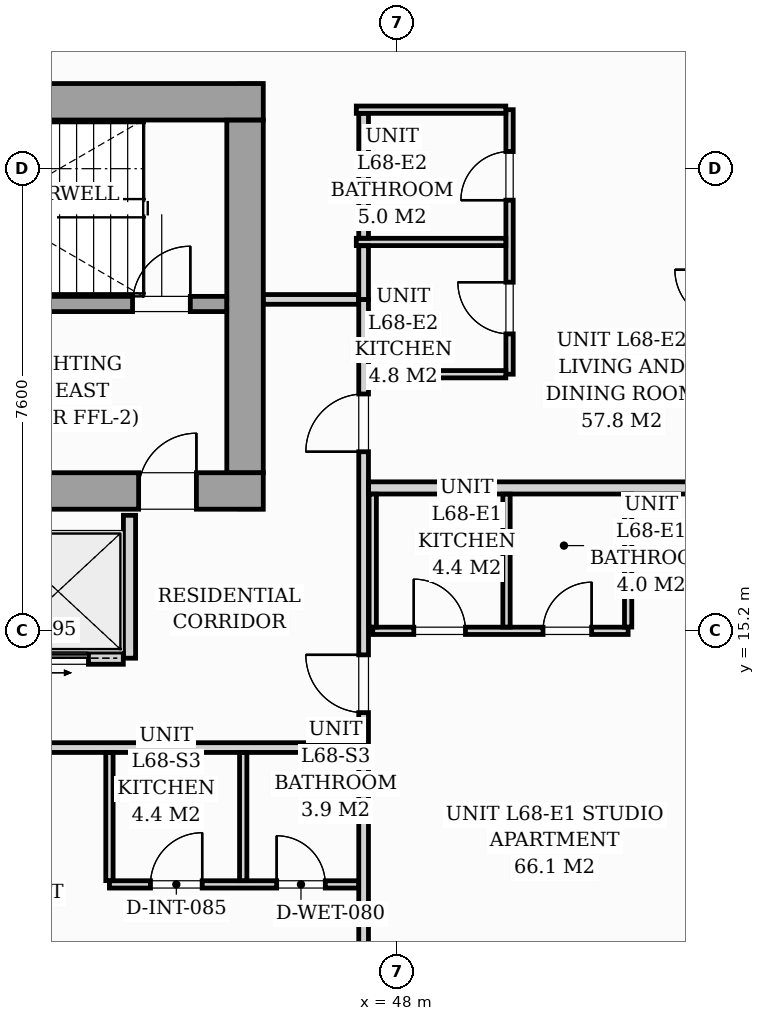
"""IFC4 building model, lengths in metres.
Left out: names, types, materials, properties, quantities, classifications, styles, units other than length and angle.
Written with IfcOpenShell. Run it as: python <this file> out.ifc"""

import sys

from ifc_helpers import new_model, si_unit, direction, frame, frame_2d, origin, origin_2d, place, context, subcontext, project, spatial, rectangle, i_section, extrude, source, transform, mapped, element, fill, save


model = new_model("IFC4")
c1 = context("Model", 3, precision=1e-05, world=origin(), true_north=direction((0.0, 1.0)))
c2 = subcontext(c1, "Body", "Model", "MODEL_VIEW")
j1 = project(units=[si_unit("LENGTHUNIT", "METRE"), si_unit("PLANEANGLEUNIT", "RADIAN")], contexts=[c1])
p1 = place(None, origin())
s1 = spatial("IfcSite", under=j1, at=p1, CompositionType="ELEMENT")
p2 = place(p1, origin())
s2 = spatial("IfcBuilding", under=s1, at=p2, CompositionType="ELEMENT")
p3 = place(p2, frame((0.0, 0.0, 236.4)))
s3 = spatial("IfcBuildingStorey", under=s2, at=p3, CompositionType="ELEMENT", Elevation=236.4)
m1 = source(origin(), c2, "Body", "SweptSolid", [
    extrude(i_section(OverallWidth=0.409, OverallDepth=0.425, WebThickness=0.033, FlangeThickness=0.052, FilletRadius=0.018, at=origin_2d()), origin(), (0.0, 0.0, 1.0), 3.296),
])
for number, where, z_axis, x_axis in (
    (1, (45.6, 17.4, 0.002), (0.0, 0.0, 1.0), (1.0, 0.0, 0.0)),
    (2, (45.6, 24.0, 0.002), (0.0, 0.0, 1.0), (1.0, 0.0, 0.0)),
):
    element("IfcColumn", number, at=place(p3, frame(where, z_axis=z_axis, x_axis=x_axis)), inside=s3, PredefinedType="PILASTER", context=c2, shape_type="MappedRepresentation", body=[
        mapped(m1, transform((0.0, 0.0, 0.0), scale=1.0)),
    ])
p4 = place(p3, frame((26.2, 17.5, 0.0), z_axis=(0.0, 0.0, 1.0), x_axis=(1.0, 0.0, 0.0)))
e3 = element("IfcWall", 3, at=p4, inside=s3, PredefinedType="SHEAR", context=c2, shape_type="SweptSolid", body=[
    extrude(rectangle(XDim=19.6, YDim=0.6, at=frame_2d((9.8, 0.0))), origin(), (0.0, 0.0, 1.0), 3.3),
])
p5 = place(p4, frame((0.95, 0.0, 0.0)))
e4 = element("IfcOpeningElement", 4, at=p5, cuts=e3, PredefinedType="OPENING", context=c2, shape_type="SweptSolid", body=[
    extrude(rectangle(XDim=0.95, YDim=2.06, at=frame_2d((0.475, 1.03))), frame((0.0, 0.31, 0.0), z_axis=(0.0, -1.0, 0.0), x_axis=(1.0, 0.0, 0.0)), (0.0, 0.0, 1.0), 0.62),
])
p6 = place(p4, frame((9.38, 0.0, 0.0)))
e5 = element("IfcOpeningElement", 5, at=p6, cuts=e3, PredefinedType="OPENING", context=c2, shape_type="SweptSolid", body=[
    extrude(rectangle(XDim=0.85, YDim=2.0, at=frame_2d((0.425, 1.0))), frame((0.0, 0.31, 0.0), z_axis=(0.0, -1.0, 0.0), x_axis=(1.0, 0.0, 0.0)), (0.0, 0.0, 1.0), 0.62),
])
p7 = place(p4, frame((17.55, 0.0, 0.0)))
e6 = element("IfcOpeningElement", 6, at=p7, cuts=e3, PredefinedType="OPENING", context=c2, shape_type="SweptSolid", body=[
    extrude(rectangle(XDim=0.95, YDim=2.06, at=frame_2d((0.475, 1.03))), frame((0.0, 0.31, 0.0), z_axis=(0.0, -1.0, 0.0), x_axis=(1.0, 0.0, 0.0)), (0.0, 0.0, 1.0), 0.62),
])
p8 = place(p3, frame((26.2, 23.9, 0.0), z_axis=(0.0, 0.0, 1.0), x_axis=(1.0, 0.0, 0.0)))
e7 = element("IfcWall", 7, at=p8, inside=s3, PredefinedType="SHEAR", context=c2, shape_type="SweptSolid", body=[
    extrude(rectangle(XDim=19.6, YDim=0.6, at=frame_2d((9.8, 0.0))), origin(), (0.0, 0.0, 1.0), 3.3),
])
p9 = place(p3, frame((45.5, 17.802, 0.0), z_axis=(0.0, 0.0, 1.0), x_axis=(0.0, 1.0, 0.0)))
e8 = element("IfcWall", 8, at=p9, inside=s3, PredefinedType="SHEAR", context=c2, shape_type="SweptSolid", body=[
    extrude(rectangle(XDim=5.796, YDim=0.6, at=frame_2d((2.898, 0.0))), origin(), (0.0, 0.0, 1.0), 3.3),
])
p10 = place(p3, frame((37.05, 20.575, 0.0), z_axis=(0.0, 0.0, 1.0), x_axis=(1.0, 0.0, 0.0)))
e9 = element("IfcWall", 9, at=p10, inside=s3, PredefinedType="SOLIDWALL", context=c2, shape_type="SweptSolid", body=[
    extrude(rectangle(XDim=8.148, YDim=0.25, at=frame_2d((4.074, 0.0))), origin(), (0.0, 0.0, 1.0), 3.3),
])
p11 = place(p10, frame((6.6, 0.0, 0.0)))
e10 = element("IfcOpeningElement", 10, at=p11, cuts=e9, PredefinedType="OPENING", context=c2, shape_type="SweptSolid", body=[
    extrude(rectangle(XDim=0.95, YDim=2.06, at=frame_2d((0.475, 1.03))), frame((0.0, 0.135, 0.0), z_axis=(0.0, -1.0, 0.0), x_axis=(1.0, 0.0, 0.0)), (0.0, 0.0, 1.0), 0.27),
])
p12 = place(p3, frame((43.6, 14.75, 0.0), z_axis=(0.0, 0.0, 1.0), x_axis=(0.0, 1.0, 0.0)))
e11 = element("IfcWall", 11, at=p12, inside=s3, PredefinedType="PARTITIONING", context=c2, shape_type="SweptSolid", body=[
    extrude(rectangle(XDim=2.35, YDim=0.2, at=frame_2d((1.175, 0.0))), origin(), (0.0, 0.0, 1.0), 3.04),
])
p13 = place(p3, frame((41.352, 14.75, 0.0), z_axis=(0.0, 0.0, 1.0), x_axis=(1.0, 0.0, 0.0)))
e12 = element("IfcWall", 12, at=p13, inside=s3, PredefinedType="PARTITIONING", context=c2, shape_type="SweptSolid", body=[
    extrude(rectangle(XDim=2.146, YDim=0.2, at=frame_2d((1.073, 0.0))), origin(), (0.0, 0.0, 1.0), 3.04),
])
p14 = place(p13, frame((0.523, 0.0, 0.0)))
e13 = element("IfcOpeningElement", 13, at=p14, cuts=e12, PredefinedType="OPENING", context=c2, shape_type="SweptSolid", body=[
    extrude(rectangle(XDim=1.05, YDim=2.08, at=frame_2d((0.525, 1.04))), frame((0.0, 0.11, 0.0), z_axis=(0.0, -1.0, 0.0), x_axis=(1.0, 0.0, 0.0)), (0.0, 0.0, 1.0), 0.22),
])
p15 = place(p3, frame((26.12, 13.28, 0.0), z_axis=(0.0, 0.0, 1.0), x_axis=(1.0, 0.0, 0.0)))
e14 = element("IfcWall", 14, at=p15, inside=s3, PredefinedType="PARTITIONING", context=c2, shape_type="SweptSolid", body=[
    extrude(rectangle(XDim=21.33, YDim=0.16, at=frame_2d((10.665, 0.0))), origin(), (0.0, 0.0, 1.0), 2.597),
])
p16 = place(p15, frame((4.704, 0.0, 0.0)))
e15 = element("IfcOpeningElement", 15, at=p16, cuts=e14, PredefinedType="OPENING", context=c2, shape_type="SweptSolid", body=[
    extrude(rectangle(XDim=0.95, YDim=2.06, at=frame_2d((0.475, 1.03))), frame((0.0, 0.09, 0.0), z_axis=(0.0, -1.0, 0.0), x_axis=(1.0, 0.0, 0.0)), (0.0, 0.0, 1.0), 0.18),
])
p17 = place(p15, frame((7.5, 0.0, 0.0)))
e16 = element("IfcOpeningElement", 16, at=p17, cuts=e14, PredefinedType="OPENING", context=c2, shape_type="SweptSolid", body=[
    extrude(rectangle(XDim=0.95, YDim=2.06, at=frame_2d((0.475, 1.03))), frame((0.0, 0.09, 0.0), z_axis=(0.0, -1.0, 0.0), x_axis=(1.0, 0.0, 0.0)), (0.0, 0.0, 1.0), 0.18),
])
p18 = place(p15, frame((14.976, 0.0, 0.0)))
e17 = element("IfcOpeningElement", 17, at=p18, cuts=e14, PredefinedType="OPENING", context=c2, shape_type="SweptSolid", body=[
    extrude(rectangle(XDim=0.95, YDim=2.06, at=frame_2d((0.475, 1.03))), frame((0.0, 0.09, 0.0), z_axis=(0.0, -1.0, 0.0), x_axis=(1.0, 0.0, 0.0)), (0.0, 0.0, 1.0), 0.18),
])
p19 = place(p3, frame((47.45, 7.993, 0.0), z_axis=(0.0, 0.0, 1.0), x_axis=(0.0, 1.0, 0.0)))
e18 = element("IfcWall", 18, at=p19, inside=s3, PredefinedType="PARTITIONING", context=c2, shape_type="SweptSolid", body=[
    extrude(rectangle(XDim=5.205, YDim=0.16, at=frame_2d((2.603, 0.0))), origin(), (0.0, 0.0, 1.0), 3.04),
])
p20 = place(p3, frame((47.45, 13.362, 0.0), z_axis=(0.0, 0.0, 1.0), x_axis=(0.0, 1.0, 0.0)))
e19 = element("IfcWall", 19, at=p20, inside=s3, PredefinedType="PARTITIONING", context=c2, shape_type="SweptSolid", body=[
    extrude(rectangle(XDim=7.288, YDim=0.16, at=frame_2d((3.644, 0.0))), origin(), (0.0, 0.0, 1.0), 3.04),
])
p21 = place(p20, frame((0.493, 0.0, 0.0)))
e20 = element("IfcOpeningElement", 20, at=p21, cuts=e19, PredefinedType="OPENING", context=c2, shape_type="SweptSolid", body=[
    extrude(rectangle(XDim=0.95, YDim=2.06, at=frame_2d((0.475, 1.03))), frame((0.0, 0.09, 0.0), z_axis=(0.0, -1.0, 0.0), x_axis=(1.0, 0.0, 0.0)), (0.0, 0.0, 1.0), 0.18),
])
p22 = place(p20, frame((4.783, 0.0, 0.0)))
e21 = element("IfcOpeningElement", 21, at=p22, cuts=e19, PredefinedType="OPENING", context=c2, shape_type="SweptSolid", body=[
    extrude(rectangle(XDim=0.95, YDim=2.06, at=frame_2d((0.475, 1.03))), frame((0.0, 0.09, 0.0), z_axis=(0.0, -1.0, 0.0), x_axis=(1.0, 0.0, 0.0)), (0.0, 0.0, 1.0), 0.18),
])
p23 = place(p3, frame((45.802, 20.65, 0.0), z_axis=(0.0, 0.0, 1.0), x_axis=(1.0, 0.0, 0.0)))
e22 = element("IfcWall", 22, at=p23, inside=s3, PredefinedType="PARTITIONING", context=c2, shape_type="SweptSolid", body=[
    extrude(rectangle(XDim=1.566, YDim=0.16, at=frame_2d((0.783, 0.0))), origin(), (0.0, 0.0, 1.0), 3.04),
])
p24 = place(p3, frame((43.27, 11.03, 0.0), z_axis=(0.0, 0.0, 1.0), x_axis=(1.0, 0.0, 0.0)))
e23 = element("IfcWall", 23, at=p24, inside=s3, PredefinedType="PARTITIONING", context=c2, shape_type="SweptSolid", body=[
    extrude(rectangle(XDim=4.098, YDim=0.12, at=frame_2d((2.049, 0.0))), origin(), (0.0, 0.0, 1.0), 3.04),
])
p25 = place(p24, frame((0.675, 0.0, 0.0)))
e24 = element("IfcOpeningElement", 24, at=p25, cuts=e23, PredefinedType="OPENING", context=c2, shape_type="SweptSolid", body=[
    extrude(rectangle(XDim=0.85, YDim=2.05, at=frame_2d((0.425, 1.025))), frame((0.0, 0.07, 0.0), z_axis=(0.0, -1.0, 0.0), x_axis=(1.0, 0.0, 0.0)), (0.0, 0.0, 1.0), 0.14),
])
p26 = place(p24, frame((2.75, 0.0, 0.0)))
e25 = element("IfcOpeningElement", 25, at=p26, cuts=e23, PredefinedType="OPENING", context=c2, shape_type="SweptSolid", body=[
    extrude(rectangle(XDim=0.8, YDim=2.02, at=frame_2d((0.4, 1.01))), frame((0.0, 0.07, 0.0), z_axis=(0.0, -1.0, 0.0), x_axis=(1.0, 0.0, 0.0)), (0.0, 0.0, 1.0), 0.14),
])
for number, where, z_axis, x_axis in (
    (26, (43.27, 11.092, 0.0), (0.0, 0.0, 1.0), (0.0, 1.0, 0.0)),
    (27, (45.47, 11.092, 0.0), (0.0, 0.0, 1.0), (0.0, 1.0, 0.0)),
):
    element("IfcWall", number, at=place(p3, frame(where, z_axis=z_axis, x_axis=x_axis)), inside=s3, PredefinedType="PARTITIONING", context=c2, shape_type="SweptSolid", body=[
        extrude(rectangle(XDim=2.106, YDim=0.12, at=frame_2d((1.053, 0.0))), origin(), (0.0, 0.0, 1.0), 3.04),
    ])
p27 = place(p3, frame((47.532, 17.55, 0.0), z_axis=(0.0, 0.0, 1.0), x_axis=(1.0, 0.0, 0.0)))
e28 = element("IfcWall", 28, at=p27, inside=s3, PredefinedType="PARTITIONING", context=c2, shape_type="SweptSolid", body=[
    extrude(rectangle(XDim=8.643, YDim=0.2, at=frame_2d((4.322, 0.0))), origin(), (0.0, 0.0, 1.0), 3.04),
])
p28 = place(p3, frame((47.6, 15.2, 0.0), z_axis=(0.0, 0.0, 1.0), x_axis=(1.0, 0.0, 0.0)))
e29 = element("IfcWall", 29, at=p28, inside=s3, PredefinedType="PARTITIONING", context=c2, shape_type="SweptSolid", body=[
    extrude(rectangle(XDim=4.2, YDim=0.12, at=frame_2d((2.1, 0.0))), origin(), (0.0, 0.0, 1.0), 3.04),
])
p29 = place(p28, frame((0.675, 0.0, 0.0)))
e30 = element("IfcOpeningElement", 30, at=p29, cuts=e29, PredefinedType="OPENING", context=c2, shape_type="SweptSolid", body=[
    extrude(rectangle(XDim=0.85, YDim=2.05, at=frame_2d((0.425, 1.025))), frame((0.0, 0.07, 0.0), z_axis=(0.0, -1.0, 0.0), x_axis=(1.0, 0.0, 0.0)), (0.0, 0.0, 1.0), 0.14),
])
p30 = place(p28, frame((2.8, 0.0, 0.0)))
e31 = element("IfcOpeningElement", 31, at=p30, cuts=e29, PredefinedType="OPENING", context=c2, shape_type="SweptSolid", body=[
    extrude(rectangle(XDim=0.8, YDim=2.02, at=frame_2d((0.4, 1.01))), frame((0.0, 0.07, 0.0), z_axis=(0.0, -1.0, 0.0), x_axis=(1.0, 0.0, 0.0)), (0.0, 0.0, 1.0), 0.14),
])
for number, where, z_axis, x_axis in (
    (32, (47.6, 15.262, 0.0), (0.0, 0.0, 1.0), (0.0, 1.0, 0.0)),
    (33, (49.8, 15.262, 0.0), (0.0, 0.0, 1.0), (0.0, 1.0, 0.0)),
    (34, (51.8, 15.262, 0.0), (0.0, 0.0, 1.0), (0.0, 1.0, 0.0)),
):
    element("IfcWall", number, at=place(p3, frame(where, z_axis=z_axis, x_axis=x_axis)), inside=s3, PredefinedType="PARTITIONING", context=c2, shape_type="SweptSolid", body=[
        extrude(rectangle(XDim=2.186, YDim=0.12, at=frame_2d((1.093, 0.0))), origin(), (0.0, 0.0, 1.0), 3.04),
    ])
p31 = place(p3, frame((49.85, 19.42, 0.0), z_axis=(0.0, 0.0, 1.0), x_axis=(0.0, 1.0, 0.0)))
e35 = element("IfcWall", 35, at=p31, inside=s3, PredefinedType="PARTITIONING", context=c2, shape_type="SweptSolid", body=[
    extrude(rectangle(XDim=4.35, YDim=0.12, at=frame_2d((2.175, 0.0))), origin(), (0.0, 0.0, 1.0), 3.04),
])
p32 = place(p31, frame((0.663, 0.0, 0.0)))
e36 = element("IfcOpeningElement", 36, at=p32, cuts=e35, PredefinedType="OPENING", context=c2, shape_type="SweptSolid", body=[
    extrude(rectangle(XDim=0.85, YDim=2.05, at=frame_2d((0.425, 1.025))), frame((0.0, 0.07, 0.0), z_axis=(0.0, -1.0, 0.0), x_axis=(1.0, 0.0, 0.0)), (0.0, 0.0, 1.0), 0.14),
])
p33 = place(p31, frame((2.862, 0.0, 0.0)))
e37 = element("IfcOpeningElement", 37, at=p33, cuts=e35, PredefinedType="OPENING", context=c2, shape_type="SweptSolid", body=[
    extrude(rectangle(XDim=0.8, YDim=2.02, at=frame_2d((0.4, 1.01))), frame((0.0, 0.07, 0.0), z_axis=(0.0, -1.0, 0.0), x_axis=(1.0, 0.0, 0.0)), (0.0, 0.0, 1.0), 0.14),
])
p34 = place(p3, frame((47.33, 21.595, 0.0), z_axis=(0.0, 0.0, 1.0), x_axis=(1.0, 0.0, 0.0)))
e38 = element("IfcWall", 38, at=p34, inside=s3, PredefinedType="PARTITIONING", context=c2, shape_type="SweptSolid", body=[
    extrude(rectangle(XDim=2.458, YDim=0.12, at=frame_2d((1.229, 0.0))), origin(), (0.0, 0.0, 1.0), 3.04),
])
p35 = place(p3, frame((47.532, 19.42, 0.0), z_axis=(0.0, 0.0, 1.0), x_axis=(1.0, 0.0, 0.0)))
e39 = element("IfcWall", 39, at=p35, inside=s3, PredefinedType="PARTITIONING", context=c2, shape_type="SweptSolid", body=[
    extrude(rectangle(XDim=2.256, YDim=0.12, at=frame_2d((1.128, 0.0))), origin(), (0.0, 0.0, 1.0), 3.04),
])
p36 = place(p3, frame((47.33, 23.77, 0.0), z_axis=(0.0, 0.0, 1.0), x_axis=(1.0, 0.0, 0.0)))
e40 = element("IfcWall", 40, at=p36, inside=s3, PredefinedType="PARTITIONING", context=c2, shape_type="SweptSolid", body=[
    extrude(rectangle(XDim=2.458, YDim=0.12, at=frame_2d((1.229, 0.0))), origin(), (0.0, 0.0, 1.0), 3.04),
])
p37 = place(p3, frame((47.45, 20.65, 0.0), z_axis=(0.0, 0.0, 1.0), x_axis=(0.0, 1.0, 0.0)))
e41 = element("IfcWall", 41, at=p37, inside=s3, PredefinedType="PARTITIONING", context=c2, shape_type="SweptSolid", body=[
    extrude(rectangle(XDim=0.883, YDim=0.16, at=frame_2d((0.441, 0.0))), origin(), (0.0, 0.0, 1.0), 3.04),
])
p38 = place(p3, frame((47.45, 21.657, 0.0), z_axis=(0.0, 0.0, 1.0), x_axis=(0.0, 1.0, 0.0)))
e42 = element("IfcWall", 42, at=p38, inside=s3, PredefinedType="PARTITIONING", context=c2, shape_type="SweptSolid", body=[
    extrude(rectangle(XDim=2.051, YDim=0.16, at=frame_2d((1.025, 0.0))), origin(), (0.0, 0.0, 1.0), 3.04),
])
m2 = source(origin(), c2, "Body", "SweptSolid", [
    extrude(rectangle(XDim=0.95, YDim=2.06, at=frame_2d((0.475, 1.03))), frame((0.0, 0.025, 0.0), z_axis=(0.0, -1.0, 0.0), x_axis=(1.0, 0.0, 0.0)), (0.0, 0.0, 1.0), 0.05),
])
p39 = place(p7, origin())
e43 = element("IfcDoor", 43, at=p39, inside=s3, OperationType="SINGLE_SWING_RIGHT", PredefinedType="DOOR", context=c2, shape_type="MappedRepresentation", body=[
    mapped(m2, transform((0.0, 0.0, 0.0), scale=1.0)),
])
fill(e6, e43)
p40 = place(p11, origin())
e44 = element("IfcDoor", 44, at=p40, inside=s3, OperationType="SINGLE_SWING_RIGHT", PredefinedType="DOOR", context=c2, shape_type="MappedRepresentation", body=[
    mapped(m2, transform((0.0, 0.0, 0.0), scale=1.0)),
])
fill(e10, e44)
m3 = source(origin(), c2, "Body", "SweptSolid", [
    extrude(rectangle(XDim=1.05, YDim=2.08, at=frame_2d((0.525, 1.04))), frame((0.0, 0.025, 0.0), z_axis=(0.0, -1.0, 0.0), x_axis=(1.0, 0.0, 0.0)), (0.0, 0.0, 1.0), 0.05),
])
p41 = place(p14, origin())
e45 = element("IfcDoor", 45, at=p41, inside=s3, OperationType="SLIDING_TO_RIGHT", PredefinedType="DOOR", context=c2, shape_type="MappedRepresentation", body=[
    mapped(m3, transform((0.0, 0.0, 0.0), scale=1.0)),
])
fill(e13, e45)
m4 = source(origin(), c2, "Body", "SweptSolid", [
    extrude(rectangle(XDim=0.85, YDim=2.05, at=frame_2d((0.425, 1.025))), frame((0.0, 0.025, 0.0), z_axis=(0.0, -1.0, 0.0), x_axis=(1.0, 0.0, 0.0)), (0.0, 0.0, 1.0), 0.05),
])
p42 = place(p25, origin())
e46 = element("IfcDoor", 46, at=p42, inside=s3, OperationType="SINGLE_SWING_RIGHT", PredefinedType="DOOR", context=c2, shape_type="MappedRepresentation", body=[
    mapped(m4, transform((0.0, 0.0, 0.0), scale=1.0)),
])
fill(e24, e46)
m5 = source(origin(), c2, "Body", "SweptSolid", [
    extrude(rectangle(XDim=0.8, YDim=2.02, at=frame_2d((0.4, 1.01))), frame((0.0, 0.025, 0.0), z_axis=(0.0, -1.0, 0.0), x_axis=(1.0, 0.0, 0.0)), (0.0, 0.0, 1.0), 0.05),
])
p43 = place(p26, origin())
e47 = element("IfcDoor", 47, at=p43, inside=s3, OperationType="SINGLE_SWING_LEFT", PredefinedType="DOOR", context=c2, shape_type="MappedRepresentation", body=[
    mapped(m5, transform((0.0, 0.0, 0.0), scale=1.0)),
])
fill(e25, e47)
m6 = source(origin(), c2, "Body", "SweptSolid", [
    extrude(rectangle(XDim=0.95, YDim=2.06, at=frame_2d((0.475, 1.03))), frame((0.0, 0.025, 0.0), z_axis=(0.0, -1.0, 0.0), x_axis=(1.0, 0.0, 0.0)), (0.0, 0.0, 1.0), 0.05),
])
p44 = place(p21, origin())
e48 = element("IfcDoor", 48, at=p44, inside=s3, OperationType="SINGLE_SWING_RIGHT", PredefinedType="DOOR", context=c2, shape_type="MappedRepresentation", body=[
    mapped(m6, transform((0.0, 0.0, 0.0), scale=1.0)),
])
fill(e20, e48)
p45 = place(p29, origin())
e49 = element("IfcDoor", 49, at=p45, inside=s3, OperationType="SINGLE_SWING_LEFT", PredefinedType="DOOR", context=c2, shape_type="MappedRepresentation", body=[
    mapped(m4, transform((0.0, 0.0, 0.0), scale=1.0)),
])
fill(e30, e49)
p46 = place(p30, origin())
e50 = element("IfcDoor", 50, at=p46, inside=s3, OperationType="SINGLE_SWING_RIGHT", PredefinedType="DOOR", context=c2, shape_type="MappedRepresentation", body=[
    mapped(m5, transform((0.0, 0.0, 0.0), scale=1.0)),
])
fill(e31, e50)
p47 = place(p22, origin())
e51 = element("IfcDoor", 51, at=p47, inside=s3, OperationType="SINGLE_SWING_LEFT", PredefinedType="DOOR", context=c2, shape_type="MappedRepresentation", body=[
    mapped(m6, transform((0.0, 0.0, 0.0), scale=1.0)),
])
fill(e21, e51)
p48 = place(p32, origin())
e52 = element("IfcDoor", 52, at=p48, inside=s3, OperationType="SINGLE_SWING_RIGHT", PredefinedType="DOOR", context=c2, shape_type="MappedRepresentation", body=[
    mapped(m4, transform((0.0, 0.0, 0.0), scale=1.0)),
])
fill(e36, e52)
p49 = place(p33, origin())
e53 = element("IfcDoor", 53, at=p49, inside=s3, OperationType="SINGLE_SWING_LEFT", PredefinedType="DOOR", context=c2, shape_type="MappedRepresentation", body=[
    mapped(m5, transform((0.0, 0.0, 0.0), scale=1.0)),
])
fill(e37, e53)
save(model, sys.argv[1])
